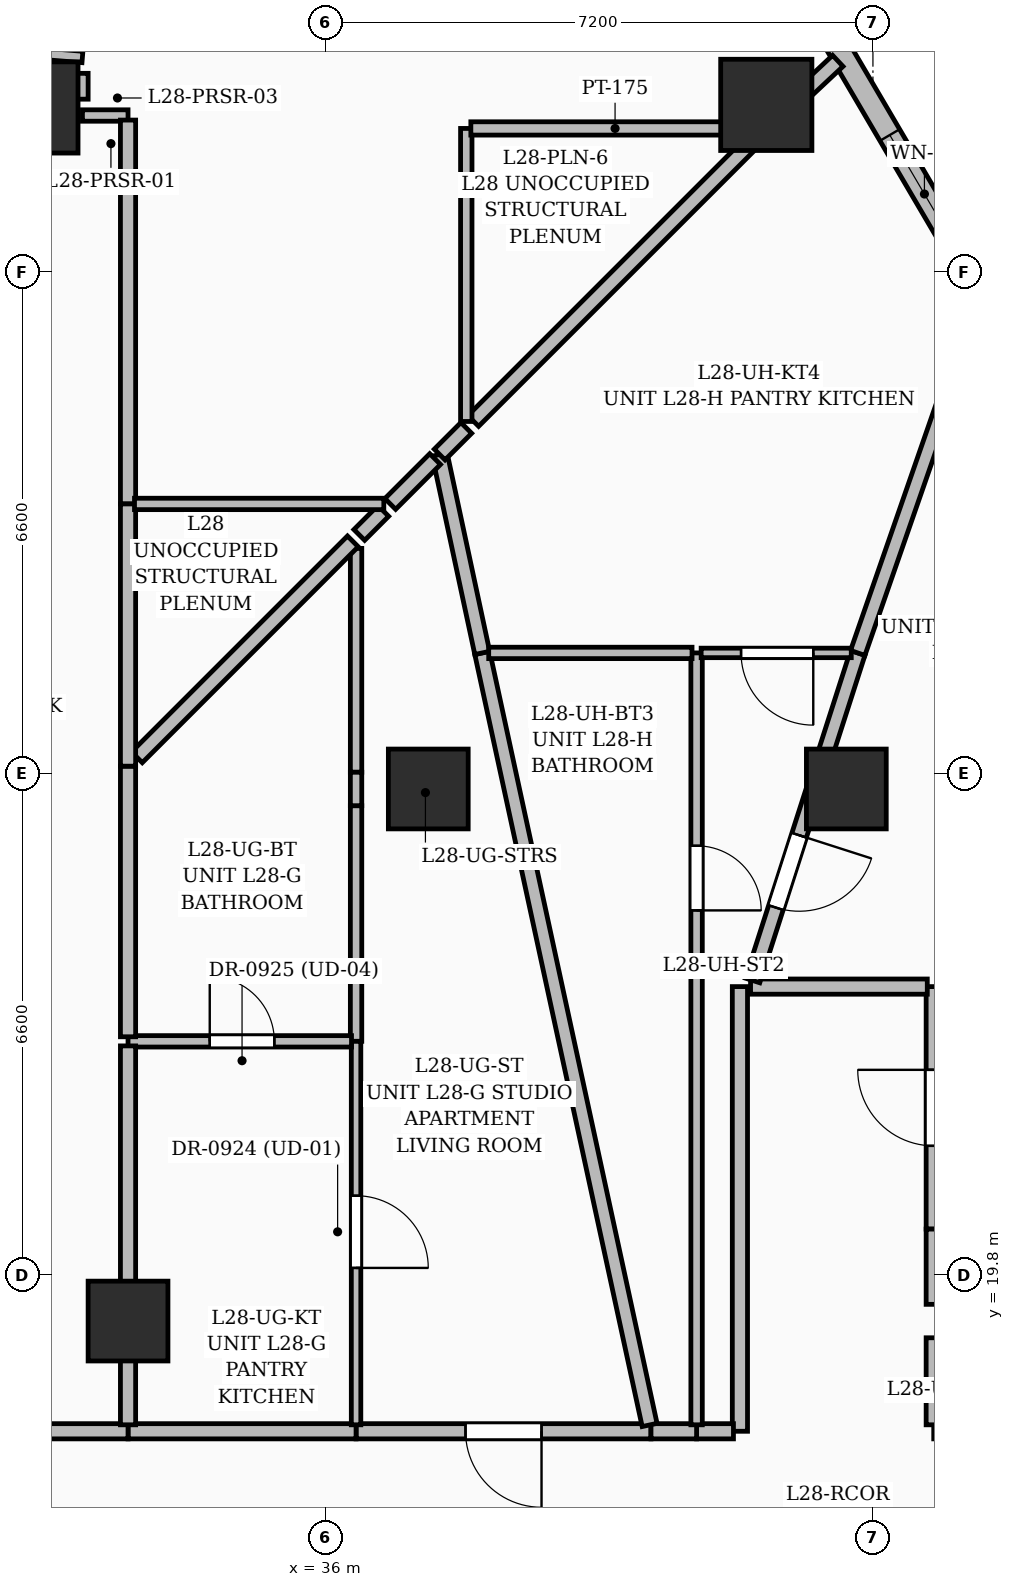
"""IFC4 building model, lengths in metres.
Left out: names, types, materials, properties, quantities, classifications, styles, units other than length and angle.
Written with IfcOpenShell. Run it as: python <this file> out.ifc"""

import sys

from ifc_helpers import new_model, si_unit, direction, frame, frame_2d, origin, origin_2d, place, context, subcontext, project, spatial, rectangle, extrude, element, fill, save


model = new_model("IFC4")
c1 = context("Model", 3, precision=1e-05, world=origin(), true_north=direction((0.0, 1.0)))
c2 = subcontext(c1, "Body", "Model", "MODEL_VIEW")
j1 = project(units=[si_unit("LENGTHUNIT", "METRE"), si_unit("PLANEANGLEUNIT", "RADIAN")], contexts=[c1])
p1 = place(None, origin())
s1 = spatial("IfcSite", under=j1, at=p1, CompositionType="ELEMENT")
p2 = place(p1, origin())
s2 = spatial("IfcBuilding", under=s1, at=p2, CompositionType="ELEMENT")
p3 = place(p2, frame((0.0, 0.0, 114.0)))
s3 = spatial("IfcBuildingStorey", under=s2, at=p3, CompositionType="ELEMENT", Elevation=114.0)
for number, where, z_axis, x_axis in (
    (1, (42.85, 26.2, 0.0), (0.0, 0.0, 1.0), (1.0, 0.0, 0.0)),
    (2, (37.35, 26.2, 0.0), (0.0, 0.0, 1.0), (1.0, 0.0, 0.0)),
    (3, (33.4, 19.2, 0.0), (0.0, 0.0, 1.0), (1.0, 0.0, 0.0)),
):
    element("IfcColumn", number, at=place(p3, frame(where, z_axis=z_axis, x_axis=x_axis)), inside=s3, PredefinedType="COLUMN", context=c2, shape_type="SweptSolid", body=[
        extrude(rectangle(XDim=1.05, YDim=1.05, at=origin_2d()), origin(), (0.0, 0.0, 1.0), 3.6),
    ])
for number, where, z_axis, x_axis in (
    (4, (41.797, 35.2, 0.0), (0.0, 0.0, 1.0), (1.0, 0.0, 0.0)),
    (5, (32.142, 35.166, 0.0), (0.0, 0.0, 1.0), (1.0, 0.0, 0.0)),
):
    element("IfcColumn", number, at=place(p3, frame(where, z_axis=z_axis, x_axis=x_axis)), inside=s3, PredefinedType="COLUMN", context=c2, shape_type="SweptSolid", body=[
        extrude(rectangle(XDim=1.2, YDim=1.2, at=origin_2d()), origin(), (0.0, 0.0, 1.0), 3.6),
    ])
p4 = place(p3, frame((42.472, 36.42, 0.0), z_axis=(0.0, 0.0, 1.0), x_axis=(0.506315009763, -0.86234860172, 0.0)))
e6 = element("IfcWall", 6, at=p4, inside=s3, PredefinedType="SOLIDWALL", context=c2, shape_type="SweptSolid", body=[
    extrude(rectangle(XDim=6.553, YDim=0.3, at=frame_2d((3.277, 0.0))), origin(), (0.0, 0.0, 1.0), 3.35),
])
p5 = place(p4, frame((1.875, 0.0, 0.6)))
e7 = element("IfcOpeningElement", 7, at=p5, cuts=e6, PredefinedType="OPENING", context=c2, shape_type="SweptSolid", body=[
    extrude(rectangle(XDim=1.8, YDim=2.1, at=frame_2d((0.9, 1.05))), frame((0.0, 0.16, 0.0), z_axis=(0.0, -1.0, 0.0), x_axis=(1.0, 0.0, 0.0)), (0.0, 0.0, 1.0), 0.32),
])
p6 = place(p3, frame((40.28, 17.75, 0.0), z_axis=(0.0, 0.0, 1.0), x_axis=(-1.0, 0.0, 0.0)))
e8 = element("IfcWall", 8, at=p6, inside=s3, PredefinedType="PARTITIONING", context=c2, shape_type="SweptSolid", body=[
    extrude(rectangle(XDim=3.88, YDim=0.2, at=frame_2d((1.94, 0.0))), origin(), (0.0, 0.0, 1.0), 3.35),
])
p7 = place(p6, frame((1.44, 0.0, 0.0)))
e9 = element("IfcOpeningElement", 9, at=p7, cuts=e8, PredefinedType="OPENING", context=c2, shape_type="SweptSolid", body=[
    extrude(rectangle(XDim=1.0, YDim=2.2, at=frame_2d((0.5, 1.1))), frame((0.0, 0.11, 0.0), z_axis=(0.0, -1.0, 0.0), x_axis=(1.0, 0.0, 0.0)), (0.0, 0.0, 1.0), 0.22),
])
p8 = place(p3, frame((36.4, 17.75, 0.0), z_axis=(0.0, 0.0, 1.0), x_axis=(-1.0, 0.0, 0.0)))
e10 = element("IfcWall", 10, at=p8, inside=s3, PredefinedType="PARTITIONING", context=c2, shape_type="SweptSolid", body=[
    extrude(rectangle(XDim=3.0, YDim=0.2, at=frame_2d((1.5, 0.0))), origin(), (0.0, 0.0, 1.0), 2.436),
])
p9 = place(p3, frame((44.0, 20.41, 0.0), z_axis=(0.0, 0.0, 1.0), x_axis=(0.0, 1.0, 0.0)))
e11 = element("IfcWall", 11, at=p9, inside=s3, PredefinedType="PARTITIONING", context=c2, shape_type="SweptSolid", body=[
    extrude(rectangle(XDim=3.19, YDim=0.2, at=frame_2d((1.595, 0.0))), origin(), (0.0, 0.0, 1.0), 2.436),
])
p10 = place(p9, frame((1.095, 0.0, 0.0)))
e12 = element("IfcOpeningElement", 12, at=p10, cuts=e11, PredefinedType="OPENING", context=c2, shape_type="SweptSolid", body=[
    extrude(rectangle(XDim=1.0, YDim=2.2, at=frame_2d((0.5, 1.1))), frame((0.0, 0.11, 0.0), z_axis=(0.0, -1.0, 0.0), x_axis=(1.0, 0.0, 0.0)), (0.0, 0.0, 1.0), 0.22),
])
p11 = place(p3, frame((43.915, 23.6, 0.0), z_axis=(0.0, 0.0, 1.0), x_axis=(-1.0, 0.0, 0.0)))
e13 = element("IfcWall", 13, at=p11, inside=s3, PredefinedType="PARTITIONING", context=c2, shape_type="SweptSolid", body=[
    extrude(rectangle(XDim=2.325, YDim=0.2, at=frame_2d((1.163, 0.0))), origin(), (0.0, 0.0, 1.0), 2.436),
])
p12 = place(p3, frame((44.0, 17.835, 0.0), z_axis=(0.0, 0.0, 1.0), x_axis=(0.0, 1.0, 0.0)))
e14 = element("IfcWall", 14, at=p12, inside=s3, PredefinedType="PARTITIONING", context=c2, shape_type="SweptSolid", body=[
    extrude(rectangle(XDim=1.145, YDim=0.2, at=frame_2d((0.573, 0.0))), origin(), (0.0, 0.0, 1.0), 3.35),
])
p13 = place(p3, frame((44.0, 19.42, 0.0), z_axis=(0.0, 0.0, 1.0), x_axis=(0.0, 1.0, 0.0)))
e15 = element("IfcWall", 15, at=p13, inside=s3, PredefinedType="PARTITIONING", context=c2, shape_type="SweptSolid", body=[
    extrude(rectangle(XDim=0.99, YDim=0.2, at=frame_2d((0.495, 0.0))), origin(), (0.0, 0.0, 1.0), 3.35),
])
p14 = place(p3, frame((33.4, 17.75, 0.0), z_axis=(0.0, 0.0, 1.0), x_axis=(-1.0, 0.0, 0.0)))
e16 = element("IfcWall", 16, at=p14, inside=s3, PredefinedType="PARTITIONING", context=c2, shape_type="SweptSolid", body=[
    extrude(rectangle(XDim=1.45, YDim=0.2, at=frame_2d((0.725, 0.0))), origin(), (0.0, 0.0, 1.0), 3.35),
])
p15 = place(p3, frame((41.45, 23.6, 0.0), z_axis=(0.0, 0.0, 1.0), x_axis=(0.0, -1.0, 0.0)))
e17 = element("IfcWall", 17, at=p15, inside=s3, PredefinedType="PARTITIONING", context=c2, shape_type="SweptSolid", body=[
    extrude(rectangle(XDim=5.85, YDim=0.2, at=frame_2d((2.925, 0.0))), origin(), (0.0, 0.0, 1.0), 3.35),
])
p16 = place(p3, frame((41.365, 17.75, 0.0), z_axis=(0.0, 0.0, 1.0), x_axis=(-1.0, 0.0, 0.0)))
e18 = element("IfcWall", 18, at=p16, inside=s3, PredefinedType="PARTITIONING", context=c2, shape_type="SweptSolid", body=[
    extrude(rectangle(XDim=0.485, YDim=0.2, at=frame_2d((0.243, 0.0))), origin(), (0.0, 0.0, 1.0), 3.35),
])
p17 = place(p3, frame((40.88, 17.75, 0.0), z_axis=(0.0, 0.0, 1.0), x_axis=(-1.0, 0.0, 0.0)))
e19 = element("IfcWall", 19, at=p17, inside=s3, PredefinedType="PARTITIONING", context=c2, shape_type="SweptSolid", body=[
    extrude(rectangle(XDim=0.6, YDim=0.2, at=frame_2d((0.3, 0.0))), origin(), (0.0, 0.0, 1.0), 3.35),
])
p18 = place(p3, frame((36.4, 25.98, 0.0), z_axis=(0.0, 0.0, 1.0), x_axis=(0.0, -1.0, 0.0)))
e20 = element("IfcWall", 20, at=p18, inside=s3, PredefinedType="PARTITIONING", context=c2, shape_type="SweptSolid", body=[
    extrude(rectangle(XDim=3.1, YDim=0.15, at=frame_2d((1.55, 0.0))), origin(), (0.0, 0.0, 1.0), 2.436),
])
p19 = place(p3, frame((36.4, 29.365, 0.0), z_axis=(0.0, 0.0, 1.0), x_axis=(0.0, -1.0, 0.0)))
e21 = element("IfcWall", 21, at=p19, inside=s3, PredefinedType="PARTITIONING", context=c2, shape_type="SweptSolid", body=[
    extrude(rectangle(XDim=2.945, YDim=0.15, at=frame_2d((1.473, 0.0))), origin(), (0.0, 0.0, 1.0), 2.372),
])
p20 = place(p3, frame((36.4, 22.88, 0.0), z_axis=(0.0, 0.0, 1.0), x_axis=(0.0, -1.0, 0.0)))
e22 = element("IfcWall", 22, at=p20, inside=s3, PredefinedType="PARTITIONING", context=c2, shape_type="SweptSolid", body=[
    extrude(rectangle(XDim=5.045, YDim=0.125, at=frame_2d((2.522, 0.0))), origin(), (0.0, 0.0, 1.0), 3.35),
])
p21 = place(p20, frame((2.031, 0.0, 0.0)))
e23 = element("IfcOpeningElement", 23, at=p21, cuts=e22, PredefinedType="OPENING", context=c2, shape_type="SweptSolid", body=[
    extrude(rectangle(XDim=0.95, YDim=2.2, at=frame_2d((0.475, 1.1))), frame((0.0, 0.072, 0.0), z_axis=(0.0, -1.0, 0.0), x_axis=(1.0, 0.0, 0.0)), (0.0, 0.0, 1.0), 0.145),
])
p22 = place(p3, frame((40.262, 17.833, 0.0), z_axis=(0.0, 0.0, 1.0), x_axis=(-0.211865908249, 0.977298744971, 0.0)))
e24 = element("IfcWall", 24, at=p22, inside=s3, PredefinedType="PARTITIONING", context=c2, shape_type="SweptSolid", body=[
    extrude(rectangle(XDim=10.393, YDim=0.2, at=frame_2d((5.196, 0.0))), origin(), (0.0, 0.0, 1.0), 2.436),
])
p23 = place(p3, frame((38.06, 27.99, 0.0), z_axis=(0.0, 0.0, 1.0), x_axis=(-0.209797646084, 0.977744827497, 0.0)))
e25 = element("IfcWall", 25, at=p23, inside=s3, PredefinedType="PARTITIONING", context=c2, shape_type="SweptSolid", body=[
    extrude(rectangle(XDim=2.669, YDim=0.2, at=frame_2d((1.335, 0.0))), origin(), (0.0, 0.0, 1.0), 2.712),
])
p24 = place(p3, frame((37.44, 30.54, 0.0), z_axis=(0.0, 0.0, 1.0), x_axis=(-0.707106781187, -0.707106781187, 0.0)))
e26 = element("IfcWall", 26, at=p24, inside=s3, PredefinedType="PARTITIONING", context=c2, shape_type="SweptSolid", body=[
    extrude(rectangle(XDim=0.834, YDim=0.2, at=frame_2d((0.417, 0.0))), origin(), (0.0, 0.0, 1.0), 2.712),
])
p25 = place(p3, frame((36.758, 29.858, 0.0), z_axis=(0.0, 0.0, 1.0), x_axis=(-0.707106781187, -0.707106781187, 0.0)))
e27 = element("IfcWall", 27, at=p25, inside=s3, PredefinedType="PARTITIONING", context=c2, shape_type="SweptSolid", body=[
    extrude(rectangle(XDim=0.447, YDim=0.2, at=frame_2d((0.223, 0.0))), origin(), (0.0, 0.0, 1.0), 3.35),
])
p26 = place(p3, frame((33.4, 22.88, 0.0), z_axis=(0.0, 0.0, 1.0), x_axis=(1.0, 0.0, 0.0)))
e28 = element("IfcWall", 28, at=p26, inside=s3, PredefinedType="PARTITIONING", context=c2, shape_type="SweptSolid", body=[
    extrude(rectangle(XDim=2.94, YDim=0.15, at=frame_2d((1.47, 0.0))), origin(), (0.0, 0.0, 1.0), 2.436),
])
p27 = place(p26, frame((1.075, 0.0, 0.0)))
e29 = element("IfcOpeningElement", 29, at=p27, cuts=e28, PredefinedType="OPENING", context=c2, shape_type="SweptSolid", body=[
    extrude(rectangle(XDim=0.85, YDim=2.1, at=frame_2d((0.425, 1.05))), frame((0.0, 0.085, 0.0), z_axis=(0.0, -1.0, 0.0), x_axis=(1.0, 0.0, 0.0)), (0.0, 0.0, 1.0), 0.17),
])
p28 = place(p3, frame((33.4, 26.5, 0.0), z_axis=(0.0, 0.0, 1.0), x_axis=(0.0, -1.0, 0.0)))
e30 = element("IfcWall", 30, at=p28, inside=s3, PredefinedType="PARTITIONING", context=c2, shape_type="SweptSolid", body=[
    extrude(rectangle(XDim=3.56, YDim=0.2, at=frame_2d((1.78, 0.0))), origin(), (0.0, 0.0, 1.0), 2.712),
])
p29 = place(p3, frame((36.358, 29.458, 0.0), z_axis=(0.0, 0.0, 1.0), x_axis=(-0.707137163672, -0.707076397395, 0.0)))
e31 = element("IfcWall", 31, at=p29, inside=s3, PredefinedType="PARTITIONING", context=c2, shape_type="SweptSolid", body=[
    extrude(rectangle(XDim=4.018, YDim=0.2, at=frame_2d((2.009, 0.0))), origin(), (0.0, 0.0, 1.0), 2.372),
])
p30 = place(p3, frame((33.4, 22.82, 0.0), z_axis=(0.0, 0.0, 1.0), x_axis=(0.0, -1.0, 0.0)))
e32 = element("IfcWall", 32, at=p30, inside=s3, PredefinedType="PARTITIONING", context=c2, shape_type="SweptSolid", body=[
    extrude(rectangle(XDim=4.985, YDim=0.2, at=frame_2d((2.493, 0.0))), origin(), (0.0, 0.0, 1.0), 2.436),
])
p31 = place(p3, frame((43.0, 27.99, 0.0), z_axis=(0.0, 0.0, 1.0), x_axis=(-0.305803129518, -0.95209476733, 0.0)))
e33 = element("IfcWall", 33, at=p31, inside=s3, PredefinedType="PARTITIONING", context=c2, shape_type="SweptSolid", body=[
    extrude(rectangle(XDim=4.526, YDim=0.2, at=frame_2d((2.263, 0.0))), origin(), (0.0, 0.0, 1.0), 2.372),
])
p32 = place(p31, frame((2.519, 0.0, 0.0)))
e34 = element("IfcOpeningElement", 34, at=p32, cuts=e33, PredefinedType="OPENING", context=c2, shape_type="SweptSolid", body=[
    extrude(rectangle(XDim=1.0, YDim=2.2, at=frame_2d((0.5, 1.1))), frame((0.0, 0.11, 0.0), z_axis=(0.0, -1.0, 0.0), x_axis=(1.0, 0.0, 0.0)), (0.0, 0.0, 1.0), 0.22),
])
p33 = place(p3, frame((44.581, 32.542, 0.0), z_axis=(0.0, 0.0, 1.0), x_axis=(-0.328103998337, -0.944641607318, 0.0)))
e35 = element("IfcWall", 35, at=p33, inside=s3, PredefinedType="PARTITIONING", context=c2, shape_type="SweptSolid", body=[
    extrude(rectangle(XDim=4.819, YDim=0.2, at=frame_2d((2.409, 0.0))), origin(), (0.0, 0.0, 1.0), 2.57),
])
p34 = place(p3, frame((33.4, 35.06, 0.0), z_axis=(0.0, 0.0, 1.0), x_axis=(-1.0, 0.0, 0.0)))
e36 = element("IfcWall", 36, at=p34, inside=s3, PredefinedType="PARTITIONING", context=c2, shape_type="SweptSolid", body=[
    extrude(rectangle(XDim=0.6, YDim=0.15, at=frame_2d((0.3, 0.0))), origin(), (0.0, 0.0, 1.0), 2.57),
])
p35 = place(p3, frame((33.4, 29.95, 0.0), z_axis=(0.0, 0.0, 1.0), x_axis=(0.0, 1.0, 0.0)))
e37 = element("IfcWall", 37, at=p35, inside=s3, PredefinedType="PARTITIONING", context=c2, shape_type="SweptSolid", body=[
    extrude(rectangle(XDim=5.05, YDim=0.2, at=frame_2d((2.525, 0.0))), origin(), (0.0, 0.0, 1.0), 2.372),
])
p36 = place(p3, frame((33.4, 26.5, 0.0), z_axis=(0.0, 0.0, 1.0), x_axis=(0.0, 1.0, 0.0)))
e38 = element("IfcWall", 38, at=p36, inside=s3, PredefinedType="PARTITIONING", context=c2, shape_type="SweptSolid", body=[
    extrude(rectangle(XDim=3.45, YDim=0.2, at=frame_2d((1.725, 0.0))), origin(), (0.0, 0.0, 1.0), 2.712),
])
p37 = place(p3, frame((40.88, 27.99, 0.0), z_axis=(0.0, 0.0, 1.0), x_axis=(0.0, -1.0, 0.0)))
e39 = element("IfcWall", 39, at=p37, inside=s3, PredefinedType="PARTITIONING", context=c2, shape_type="SweptSolid", body=[
    extrude(rectangle(XDim=10.155, YDim=0.15, at=frame_2d((5.078, 0.0))), origin(), (0.0, 0.0, 1.0), 2.436),
])
p38 = place(p37, frame((2.537, 0.0, 0.0)))
e40 = element("IfcOpeningElement", 40, at=p38, cuts=e39, PredefinedType="OPENING", context=c2, shape_type="SweptSolid", body=[
    extrude(rectangle(XDim=0.85, YDim=2.1, at=frame_2d((0.425, 1.05))), frame((0.0, 0.085, 0.0), z_axis=(0.0, -1.0, 0.0), x_axis=(1.0, 0.0, 0.0)), (0.0, 0.0, 1.0), 0.17),
])
p39 = place(p3, frame((42.915, 27.99, 0.0), z_axis=(0.0, 0.0, 1.0), x_axis=(-1.0, 0.0, 0.0)))
e41 = element("IfcWall", 41, at=p39, inside=s3, PredefinedType="PARTITIONING", context=c2, shape_type="SweptSolid", body=[
    extrude(rectangle(XDim=1.975, YDim=0.125, at=frame_2d((0.988, 0.0))), origin(), (0.0, 0.0, 1.0), 2.372),
])
p40 = place(p39, frame((0.5, 0.0, 0.0)))
e42 = element("IfcOpeningElement", 42, at=p40, cuts=e41, PredefinedType="OPENING", context=c2, shape_type="SweptSolid", body=[
    extrude(rectangle(XDim=0.95, YDim=2.2, at=frame_2d((0.475, 1.1))), frame((0.0, 0.072, 0.0), z_axis=(0.0, -1.0, 0.0), x_axis=(1.0, 0.0, 0.0)), (0.0, 0.0, 1.0), 0.145),
])
p41 = place(p3, frame((40.82, 27.99, 0.0), z_axis=(0.0, 0.0, 1.0), x_axis=(-1.0, 0.0, 0.0)))
e43 = element("IfcWall", 43, at=p41, inside=s3, PredefinedType="PARTITIONING", context=c2, shape_type="SweptSolid", body=[
    extrude(rectangle(XDim=2.675, YDim=0.15, at=frame_2d((1.337, 0.0))), origin(), (0.0, 0.0, 1.0), 3.35),
])
p42 = place(p3, frame((37.85, 30.95, 0.0), z_axis=(0.0, 0.0, 1.0), x_axis=(-0.707353374636, -0.706860101711, 0.0)))
e44 = element("IfcWall", 44, at=p42, inside=s3, PredefinedType="PARTITIONING", context=c2, shape_type="SweptSolid", body=[
    extrude(rectangle(XDim=0.495, YDim=0.2, at=frame_2d((0.248, 0.0))), origin(), (0.0, 0.0, 1.0), 2.712),
])
p43 = place(p3, frame((42.738, 35.779, 0.0), z_axis=(0.0, 0.0, 1.0), x_axis=(-0.729379024936, -0.684109814272, 0.0)))
e45 = element("IfcWall", 45, at=p43, inside=s3, PredefinedType="PARTITIONING", context=c2, shape_type="SweptSolid", body=[
    extrude(rectangle(XDim=1.3, YDim=0.2, at=frame_2d((0.65, 0.0))), origin(), (0.0, 0.0, 1.0), 3.35),
])
p44 = place(p3, frame((41.684, 34.784, 0.0), z_axis=(0.0, 0.0, 1.0), x_axis=(-0.707106781187, -0.707106781187, 0.0)))
e46 = element("IfcWall", 46, at=p44, inside=s3, PredefinedType="PARTITIONING", context=c2, shape_type="SweptSolid", body=[
    extrude(rectangle(XDim=5.292, YDim=0.2, at=frame_2d((2.646, 0.0))), origin(), (0.0, 0.0, 1.0), 2.712),
])
p45 = place(p3, frame((33.485, 29.95, 0.0), z_axis=(0.0, 0.0, 1.0), x_axis=(1.0, 0.0, 0.0)))
e47 = element("IfcWall", 47, at=p45, inside=s3, PredefinedType="PARTITIONING", context=c2, shape_type="SweptSolid", body=[
    extrude(rectangle(XDim=3.28, YDim=0.15, at=frame_2d((1.64, 0.0))), origin(), (0.0, 0.0, 1.0), 2.372),
])
p46 = place(p3, frame((37.85, 31.035, 0.0), z_axis=(0.0, 0.0, 1.0), x_axis=(0.0, 1.0, 0.0)))
e48 = element("IfcWall", 48, at=p46, inside=s3, PredefinedType="PARTITIONING", context=c2, shape_type="SweptSolid", body=[
    extrude(rectangle(XDim=3.855, YDim=0.15, at=frame_2d((1.927, 0.0))), origin(), (0.0, 0.0, 1.0), 2.712),
])
p47 = place(p3, frame((37.91, 34.89, 0.0), z_axis=(0.0, 0.0, 1.0), x_axis=(1.0, 0.0, 0.0)))
e49 = element("IfcWall", 49, at=p47, inside=s3, PredefinedType="PARTITIONING", context=c2, shape_type="SweptSolid", body=[
    extrude(rectangle(XDim=3.795, YDim=0.175, at=frame_2d((1.897, 0.0))), origin(), (0.0, 0.0, 1.0), 2.57),
])
p48 = place(p3, frame((36.4, 25.98, 0.0), z_axis=(0.0, 0.0, 1.0), x_axis=(0.0, 1.0, 0.0)))
e50 = element("IfcWall", 50, at=p48, inside=s3, PredefinedType="PARTITIONING", context=c2, shape_type="SweptSolid", body=[
    extrude(rectangle(XDim=0.44, YDim=0.15, at=frame_2d((0.22, 0.0))), origin(), (0.0, 0.0, 1.0), 3.35),
])
p49 = place(p3, frame((31.347, 35.949, 0.0), z_axis=(0.0, 0.0, 1.0), x_axis=(0.996669356606, -0.081548719198, 0.0)))
e51 = element("IfcWall", 51, at=p49, inside=s3, PredefinedType="PARTITIONING", context=c2, shape_type="SweptSolid", body=[
    extrude(rectangle(XDim=1.458, YDim=0.15, at=frame_2d((0.729, 0.0))), origin(), (0.0, 0.0, 1.0), 3.35),
])
p50 = place(p3, frame((32.8, 35.615, 0.0), z_axis=(0.0, 0.0, 1.0), x_axis=(0.0, -1.0, 0.0)))
e52 = element("IfcWall", 52, at=p50, inside=s3, PredefinedType="PARTITIONING", context=c2, shape_type="SweptSolid", body=[
    extrude(rectangle(XDim=0.34, YDim=0.15, at=frame_2d((0.17, 0.0))), origin(), (0.0, 0.0, 1.0), 2.57),
])
p51 = place(p5, origin())
e53 = element("IfcWindow", 53, at=p51, inside=s3, PartitioningType="SINGLE_PANEL", PredefinedType="WINDOW", context=c2, shape_type="SweptSolid", body=[
    extrude(rectangle(XDim=1.8, YDim=2.1, at=frame_2d((0.9, 1.05))), frame((0.0, 0.03, 0.0), z_axis=(0.0, -1.0, 0.0), x_axis=(1.0, 0.0, 0.0)), (0.0, 0.0, 1.0), 0.06),
])
fill(e7, e53)
p52 = place(p7, origin())
e54 = element("IfcDoor", 54, at=p52, inside=s3, OperationType="SINGLE_SWING_LEFT", PredefinedType="DOOR", context=c2, shape_type="SweptSolid", body=[
    extrude(rectangle(XDim=1.0, YDim=2.2, at=frame_2d((0.5, 1.1))), frame((0.0, 0.025, 0.0), z_axis=(0.0, -1.0, 0.0), x_axis=(1.0, 0.0, 0.0)), (0.0, 0.0, 1.0), 0.05),
])
fill(e9, e54)
p53 = place(p21, origin())
e55 = element("IfcDoor", 55, at=p53, inside=s3, OperationType="SINGLE_SWING_RIGHT", PredefinedType="DOOR", context=c2, shape_type="SweptSolid", body=[
    extrude(rectangle(XDim=0.95, YDim=2.2, at=frame_2d((0.475, 1.1))), frame((0.0, 0.025, 0.0), z_axis=(0.0, -1.0, 0.0), x_axis=(1.0, 0.0, 0.0)), (0.0, 0.0, 1.0), 0.05),
])
fill(e23, e55)
p54 = place(p27, origin())
e56 = element("IfcDoor", 56, at=p54, inside=s3, OperationType="SINGLE_SWING_LEFT", PredefinedType="DOOR", context=c2, shape_type="SweptSolid", body=[
    extrude(rectangle(XDim=0.85, YDim=2.1, at=frame_2d((0.425, 1.05))), frame((0.0, 0.025, 0.0), z_axis=(0.0, -1.0, 0.0), x_axis=(1.0, 0.0, 0.0)), (0.0, 0.0, 1.0), 0.05),
])
fill(e29, e56)
p55 = place(p10, origin())
e57 = element("IfcDoor", 57, at=p55, inside=s3, OperationType="SINGLE_SWING_RIGHT", PredefinedType="DOOR", context=c2, shape_type="SweptSolid", body=[
    extrude(rectangle(XDim=1.0, YDim=2.2, at=frame_2d((0.5, 1.1))), frame((0.0, 0.025, 0.0), z_axis=(0.0, -1.0, 0.0), x_axis=(1.0, 0.0, 0.0)), (0.0, 0.0, 1.0), 0.05),
])
fill(e12, e57)
p56 = place(p40, origin())
e58 = element("IfcDoor", 58, at=p56, inside=s3, OperationType="SINGLE_SWING_LEFT", PredefinedType="DOOR", context=c2, shape_type="SweptSolid", body=[
    extrude(rectangle(XDim=0.95, YDim=2.2, at=frame_2d((0.475, 1.1))), frame((0.0, 0.025, 0.0), z_axis=(0.0, -1.0, 0.0), x_axis=(1.0, 0.0, 0.0)), (0.0, 0.0, 1.0), 0.05),
])
fill(e42, e58)
p57 = place(p38, origin())
e59 = element("IfcDoor", 59, at=p57, inside=s3, OperationType="SINGLE_SWING_RIGHT", PredefinedType="DOOR", context=c2, shape_type="SweptSolid", body=[
    extrude(rectangle(XDim=0.85, YDim=2.1, at=frame_2d((0.425, 1.05))), frame((0.0, 0.025, 0.0), z_axis=(0.0, -1.0, 0.0), x_axis=(1.0, 0.0, 0.0)), (0.0, 0.0, 1.0), 0.05),
])
fill(e40, e59)
p58 = place(p32, origin())
e60 = element("IfcDoor", 60, at=p58, inside=s3, OperationType="SINGLE_SWING_LEFT", PredefinedType="DOOR", context=c2, shape_type="SweptSolid", body=[
    extrude(rectangle(XDim=1.0, YDim=2.2, at=frame_2d((0.5, 1.1))), frame((0.0, 0.025, 0.0), z_axis=(0.0, -1.0, 0.0), x_axis=(1.0, 0.0, 0.0)), (0.0, 0.0, 1.0), 0.05),
])
fill(e34, e60)
save(model, sys.argv[1])
